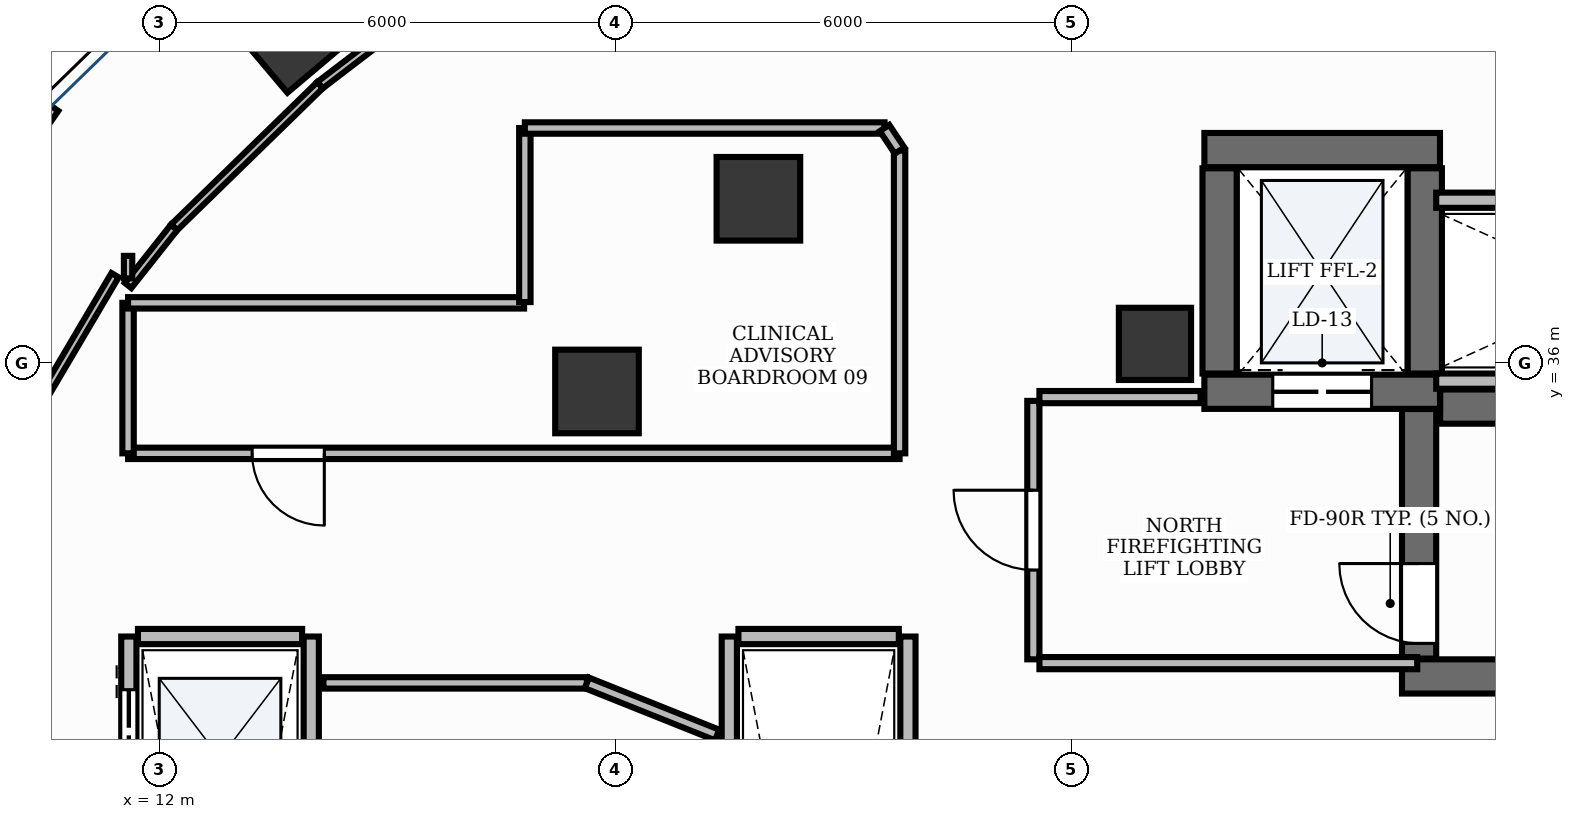
"""IFC4 building model, lengths in metres.
Left out: names, types, materials, properties, quantities, classifications, styles, units other than length and angle.
Written with IfcOpenShell. Run it as: python <this file> out.ifc"""

import sys

from ifc_helpers import new_model, si_unit, direction, frame, frame_2d, origin, origin_2d, place, context, subcontext, project, spatial, rectangle, extrude, element, fill, save


model = new_model("IFC4")
c1 = context("Model", 3, precision=1e-05, world=origin(), true_north=direction((0.0, 1.0)))
c2 = subcontext(c1, "Body", "Model", "MODEL_VIEW")
j1 = project(units=[si_unit("LENGTHUNIT", "METRE"), si_unit("PLANEANGLEUNIT", "RADIAN")], contexts=[c1])
p1 = place(None, origin())
s1 = spatial("IfcSite", under=j1, at=p1, CompositionType="ELEMENT")
p2 = place(p1, origin())
s2 = spatial("IfcBuilding", under=s1, at=p2, CompositionType="ELEMENT")
p3 = place(p2, frame((0.0, 0.0, 119.4)))
s3 = spatial("IfcBuildingStorey", under=s2, at=p3, CompositionType="ELEMENT", Elevation=119.4)
p4 = place(p3, frame((28.852, 35.425, 0.0), z_axis=(0.0, 0.0, 1.0), x_axis=(1.0, 0.0, 0.0)))
e1 = element("IfcWall", 1, at=p4, inside=s3, PredefinedType="SHEAR", context=c2, shape_type="SweptSolid", body=[
    extrude(rectangle(XDim=8.248, YDim=0.45, at=frame_2d((4.124, 0.0))), origin(), (0.0, 0.0, 1.0), 3.9),
])
p5 = place(p3, frame((28.35, 31.875, 0.0), z_axis=(0.0, 0.0, 1.0), x_axis=(1.0, 0.0, 0.0)))
e2 = element("IfcWall", 2, at=p5, inside=s3, PredefinedType="SHEAR", context=c2, shape_type="SweptSolid", body=[
    extrude(rectangle(XDim=8.75, YDim=0.45, at=frame_2d((4.375, 0.0))), origin(), (0.0, 0.0, 1.0), 3.9),
])
p6 = place(p3, frame((28.575, 32.11, 0.0), z_axis=(0.0, 0.0, 1.0), x_axis=(0.0, 1.0, 0.0)))
e3 = element("IfcWall", 3, at=p6, inside=s3, PredefinedType="SHEAR", context=c2, shape_type="SweptSolid", body=[
    extrude(rectangle(XDim=3.283, YDim=0.45, at=frame_2d((1.642, 0.0))), origin(), (0.0, 0.0, 1.0), 3.9),
])
p7 = place(p6, frame((0.2, 0.0, 0.0)))
e4 = element("IfcOpeningElement", 4, at=p7, cuts=e3, PredefinedType="OPENING", context=c2, shape_type="SweptSolid", body=[
    extrude(rectangle(XDim=1.05, YDim=2.15, at=frame_2d((0.525, 1.075))), frame((0.0, 0.24, 0.0), z_axis=(0.0, -1.0, 0.0), x_axis=(1.0, 0.0, 0.0)), (0.0, 0.0, 1.0), 0.48),
])
p8 = place(p3, frame((25.75, 38.8, 0.0), z_axis=(0.0, 0.0, 1.0), x_axis=(1.0, 0.0, 0.0)))
e5 = element("IfcWall", 5, at=p8, inside=s3, PredefinedType="SHEAR", context=c2, shape_type="SweptSolid", body=[
    extrude(rectangle(XDim=3.1, YDim=0.45, at=frame_2d((1.55, 0.0))), origin(), (0.0, 0.0, 1.0), 3.9),
])
p9 = place(p3, frame((25.75, 35.62, 0.0), z_axis=(0.0, 0.0, 1.0), x_axis=(1.0, 0.0, 0.0)))
e6 = element("IfcWall", 6, at=p9, inside=s3, PredefinedType="SHEAR", context=c2, shape_type="SweptSolid", body=[
    extrude(rectangle(XDim=3.1, YDim=0.45, at=frame_2d((1.55, 0.0))), origin(), (0.0, 0.0, 1.0), 3.9),
])
p10 = place(p9, frame((0.9, 0.0, 0.0)))
e7 = element("IfcOpeningElement", 7, at=p10, cuts=e6, PredefinedType="OPENING", context=c2, shape_type="SweptSolid", body=[
    extrude(rectangle(XDim=1.3, YDim=2.2, at=frame_2d((0.65, 1.1))), frame((0.0, 0.24, 0.0), z_axis=(0.0, -1.0, 0.0), x_axis=(1.0, 0.0, 0.0)), (0.0, 0.0, 1.0), 0.48),
])
for number, where, z_axis, x_axis in (
    (8, (25.95, 35.86, 0.0), (0.0, 0.0, 1.0), (0.0, 1.0, 0.0)),
    (9, (28.65, 35.86, 0.0), (0.0, 0.0, 1.0), (0.0, 1.0, 0.0)),
):
    element("IfcWall", number, at=place(p3, frame(where, z_axis=z_axis, x_axis=x_axis)), inside=s3, PredefinedType="SHEAR", context=c2, shape_type="SweptSolid", body=[
        extrude(rectangle(XDim=2.7, YDim=0.45, at=frame_2d((1.35, 0.0))), origin(), (0.0, 0.0, 1.0), 3.9),
    ])
p11 = place(p3, frame((25.1, 36.25, -0.0), z_axis=(0.0, 0.0, 1.0), x_axis=(1.0, 0.0, 0.0)))
e10 = element("IfcColumn", 10, at=p11, inside=s3, PredefinedType="PILASTER", context=c2, shape_type="SweptSolid", body=[
    extrude(rectangle(XDim=0.95, YDim=0.95, at=origin_2d()), origin(), (0.0, 0.0, 1.0), 3.901),
])
p12 = place(p3, frame((13.758, 40.4, -0.0), z_axis=(0.0, 0.0, 1.0), x_axis=(0.764246456939, 0.644924300253, 0.0)))
e11 = element("IfcColumn", 11, at=p12, inside=s3, PredefinedType="COLUMN", context=c2, shape_type="SweptSolid", body=[
    extrude(rectangle(XDim=1.2, YDim=1.2, at=origin_2d()), origin(), (0.0, 0.0, 1.0), 3.901),
])
for number, where, z_axis, x_axis in (
    (12, (19.883, 38.159, -0.0), (0.0, 0.0, 1.0), (1.0, 0.0, 0.0)),
    (13, (17.759, 35.624, -0.0), (0.0, 0.0, 1.0), (1.0, 0.0, 0.0)),
):
    element("IfcColumn", number, at=place(p3, frame(where, z_axis=z_axis, x_axis=x_axis)), inside=s3, PredefinedType="COLUMN", context=c2, shape_type="SweptSolid", body=[
        extrude(rectangle(XDim=1.1, YDim=1.1, at=origin_2d()), origin(), (0.0, 0.0, 1.0), 3.901),
    ])
p13 = place(p3, frame((10.548, 39.4, 0.0), z_axis=(0.0, 0.0, 1.0), x_axis=(-0.566825798999, -0.823837674296, 0.0)))
e14 = element("IfcWall", 14, at=p13, inside=s3, PredefinedType="STANDARD", context=c2, shape_type="SweptSolid", body=[
    extrude(rectangle(XDim=5.826, YDim=0.3, at=frame_2d((2.913, 0.0))), origin(), (0.0, 0.0, 1.0), 3.9),
])
p14 = place(p3, frame((11.6, 21.6, 0.0), z_axis=(0.0, 0.0, 1.0), x_axis=(0.0, 1.0, 0.0)))
e15 = element("IfcWall", 15, at=p14, inside=s3, PredefinedType="PARTITIONING", context=c2, shape_type="SweptSolid", body=[
    extrude(rectangle(XDim=10.8, YDim=0.2, at=frame_2d((5.4, 0.0))), origin(), (0.0, 0.0, 1.0), 2.91),
])
p15 = place(p14, frame((0.9, 0.0, 0.0)))
e16 = element("IfcOpeningElement", 16, at=p15, cuts=e15, PredefinedType="OPENING", context=c2, shape_type="SweptSolid", body=[
    extrude(rectangle(XDim=1.1, YDim=2.2, at=frame_2d((0.55, 1.1))), frame((0.0, 0.115, 0.0), z_axis=(0.0, -1.0, 0.0), x_axis=(1.0, 0.0, 0.0)), (0.0, 0.0, 1.0), 0.23),
])
p16 = place(p14, frame((3.6, 0.0, 0.0)))
e17 = element("IfcOpeningElement", 17, at=p16, cuts=e15, PredefinedType="OPENING", context=c2, shape_type="SweptSolid", body=[
    extrude(rectangle(XDim=1.1, YDim=2.2, at=frame_2d((0.55, 1.1))), frame((0.0, 0.115, 0.0), z_axis=(0.0, -1.0, 0.0), x_axis=(1.0, 0.0, 0.0)), (0.0, 0.0, 1.0), 0.23),
])
p17 = place(p14, frame((6.3, 0.0, 0.0)))
e18 = element("IfcOpeningElement", 18, at=p17, cuts=e15, PredefinedType="OPENING", context=c2, shape_type="SweptSolid", body=[
    extrude(rectangle(XDim=1.1, YDim=2.2, at=frame_2d((0.55, 1.1))), frame((0.0, 0.115, 0.0), z_axis=(0.0, -1.0, 0.0), x_axis=(1.0, 0.0, 0.0)), (0.0, 0.0, 1.0), 0.23),
])
p18 = place(p14, frame((9.0, 0.0, 0.0)))
e19 = element("IfcOpeningElement", 19, at=p18, cuts=e15, PredefinedType="OPENING", context=c2, shape_type="SweptSolid", body=[
    extrude(rectangle(XDim=1.1, YDim=2.2, at=frame_2d((0.55, 1.1))), frame((0.0, 0.115, 0.0), z_axis=(0.0, -1.0, 0.0), x_axis=(1.0, 0.0, 0.0)), (0.0, 0.0, 1.0), 0.23),
])
p19 = place(p3, frame((14.0, 21.6, 0.0), z_axis=(0.0, 0.0, 1.0), x_axis=(0.0, 1.0, 0.0)))
e20 = element("IfcWall", 20, at=p19, inside=s3, PredefinedType="PARTITIONING", context=c2, shape_type="SweptSolid", body=[
    extrude(rectangle(XDim=10.8, YDim=0.2, at=frame_2d((5.4, 0.0))), origin(), (0.0, 0.0, 1.0), 2.91),
])
p20 = place(p3, frame((11.72, 32.4, 0.0), z_axis=(0.0, 0.0, 1.0), x_axis=(1.0, 0.0, 0.0)))
e21 = element("IfcWall", 21, at=p20, inside=s3, PredefinedType="PARTITIONING", context=c2, shape_type="SweptSolid", body=[
    extrude(rectangle(XDim=2.16, YDim=0.2, at=frame_2d((1.08, 0.0))), origin(), (0.0, 0.0, 1.0), 2.91),
])
for number, where, z_axis, x_axis in (
    (22, (19.5, 21.6, 0.0), (0.0, 0.0, 1.0), (0.0, 1.0, 0.0)),
    (23, (21.85, 21.6, 0.0), (0.0, 0.0, 1.0), (0.0, 1.0, 0.0)),
):
    element("IfcWall", number, at=place(p3, frame(where, z_axis=z_axis, x_axis=x_axis)), inside=s3, PredefinedType="PARTITIONING", context=c2, shape_type="SweptSolid", body=[
        extrude(rectangle(XDim=10.8, YDim=0.2, at=frame_2d((5.4, 0.0))), origin(), (0.0, 0.0, 1.0), 2.91),
    ])
p21 = place(p3, frame((19.62, 32.4, 0.0), z_axis=(0.0, 0.0, 1.0), x_axis=(1.0, 0.0, 0.0)))
e24 = element("IfcWall", 24, at=p21, inside=s3, PredefinedType="PARTITIONING", context=c2, shape_type="SweptSolid", body=[
    extrude(rectangle(XDim=2.11, YDim=0.2, at=frame_2d((1.055, 0.0))), origin(), (0.0, 0.0, 1.0), 2.91),
])
for number, where, z_axis, x_axis in (
    (25, (28.8, 35.76, 0.0), (0.0, 0.0, 1.0), (1.0, 0.0, 0.0)),
    (26, (28.8, 38.14, 0.0), (0.0, 0.0, 1.0), (1.0, 0.0, 0.0)),
):
    element("IfcWall", number, at=place(p3, frame(where, z_axis=z_axis, x_axis=x_axis)), inside=s3, PredefinedType="PARTITIONING", context=c2, shape_type="SweptSolid", body=[
        extrude(rectangle(XDim=4.57, YDim=0.2, at=frame_2d((2.285, 0.0))), origin(), (0.0, 0.0, 1.0), 2.91),
    ])
p22 = place(p3, frame((23.5, 32.1, 0.0), z_axis=(0.0, 0.0, 1.0), x_axis=(0.0, 1.0, 0.0)))
e27 = element("IfcWall", 27, at=p22, inside=s3, PredefinedType="PARTITIONING", context=c2, shape_type="SweptSolid", body=[
    extrude(rectangle(XDim=3.4, YDim=0.16, at=frame_2d((1.7, 0.0))), origin(), (0.0, 0.0, 1.0), 2.91),
])
p23 = place(p22, frame((1.175, 0.0, 0.0)))
e28 = element("IfcOpeningElement", 28, at=p23, cuts=e27, PredefinedType="OPENING", context=c2, shape_type="SweptSolid", body=[
    extrude(rectangle(XDim=1.05, YDim=2.15, at=frame_2d((0.525, 1.075))), frame((0.0, 0.095, 0.0), z_axis=(0.0, -1.0, 0.0), x_axis=(1.0, 0.0, 0.0)), (0.0, 0.0, 1.0), 0.19),
])
p24 = place(p3, frame((23.58, 32.05, 0.0), z_axis=(0.0, 0.0, 1.0), x_axis=(1.0, 0.0, 0.0)))
e29 = element("IfcWall", 29, at=p24, inside=s3, PredefinedType="PARTITIONING", context=c2, shape_type="SweptSolid", body=[
    extrude(rectangle(XDim=4.97, YDim=0.16, at=frame_2d((2.485, 0.0))), origin(), (0.0, 0.0, 1.0), 2.91),
])
p25 = place(p3, frame((23.58, 35.55, 0.0), z_axis=(0.0, 0.0, 1.0), x_axis=(1.0, 0.0, 0.0)))
e30 = element("IfcWall", 30, at=p25, inside=s3, PredefinedType="PARTITIONING", context=c2, shape_type="SweptSolid", body=[
    extrude(rectangle(XDim=2.12, YDim=0.16, at=frame_2d((1.06, 0.0))), origin(), (0.0, 0.0, 1.0), 2.91),
])
p26 = place(p3, frame((21.74, 34.81, 0.0), z_axis=(0.0, 0.0, 1.0), x_axis=(-1.0, 0.0, 0.0)))
e31 = element("IfcWall", 31, at=p26, inside=s3, PredefinedType="PARTITIONING", context=c2, shape_type="SweptSolid", body=[
    extrude(rectangle(XDim=10.15, YDim=0.15, at=frame_2d((5.075, 0.0))), origin(), (0.0, 0.0, 1.0), 2.91),
])
p27 = place(p26, frame((7.568, 0.0, 0.0)))
e32 = element("IfcOpeningElement", 32, at=p27, cuts=e31, PredefinedType="OPENING", context=c2, shape_type="SweptSolid", body=[
    extrude(rectangle(XDim=0.95, YDim=2.15, at=frame_2d((0.475, 1.075))), frame((0.0, 0.09, 0.0), z_axis=(0.0, -1.0, 0.0), x_axis=(1.0, 0.0, 0.0)), (0.0, 0.0, 1.0), 0.18),
])
p28 = place(p3, frame((14.16, 31.79, 0.0), z_axis=(0.0, 0.0, 1.0), x_axis=(1.0, 0.0, 0.0)))
e33 = element("IfcWall", 33, at=p28, inside=s3, PredefinedType="PARTITIONING", context=c2, shape_type="SweptSolid", body=[
    extrude(rectangle(XDim=3.467, YDim=0.15, at=frame_2d((1.733, 0.0))), origin(), (0.0, 0.0, 1.0), 2.91),
])
p29 = place(p3, frame((17.626, 31.79, 0.0), z_axis=(0.0, 0.0, 1.0), x_axis=(0.928485814786, -0.371367865789, 0.0)))
e34 = element("IfcWall", 34, at=p29, inside=s3, PredefinedType="PARTITIONING", context=c2, shape_type="SweptSolid", body=[
    extrude(rectangle(XDim=1.845, YDim=0.15, at=frame_2d((0.923, 0.0))), origin(), (0.0, 0.0, 1.0), 2.91),
])
p30 = place(p3, frame((16.339, 41.354, 0.0), z_axis=(0.0, 0.0, 1.0), x_axis=(-0.794513779695, -0.607246122981, 0.0)))
e35 = element("IfcWall", 35, at=p30, inside=s3, PredefinedType="MOVABLE", context=c2, shape_type="SweptSolid", body=[
    extrude(rectangle(XDim=2.799, YDim=0.11, at=frame_2d((1.399, 0.0))), origin(), (0.0, 0.0, 1.0), 2.91),
])
p31 = place(p3, frame((14.114, 39.653, 0.0), z_axis=(0.0, 0.0, 1.0), x_axis=(-0.716161838398, -0.697934252794, 0.0)))
e36 = element("IfcWall", 36, at=p31, inside=s3, PredefinedType="MOVABLE", context=c2, shape_type="SweptSolid", body=[
    extrude(rectangle(XDim=2.679, YDim=0.11, at=frame_2d((1.339, 0.0))), origin(), (0.0, 0.0, 1.0), 2.91),
])
p32 = place(p3, frame((12.195, 37.782, 0.0), z_axis=(0.0, 0.0, 1.0), x_axis=(-0.621081637991, -0.783745876513, 0.0)))
e37 = element("IfcWall", 37, at=p32, inside=s3, PredefinedType="MOVABLE", context=c2, shape_type="SweptSolid", body=[
    extrude(rectangle(XDim=0.974, YDim=0.11, at=frame_2d((0.487, 0.0))), origin(), (0.0, 0.0, 1.0), 2.91),
])
p33 = place(p3, frame((11.59, 37.112, 0.0), z_axis=(0.0, 0.0, 1.0), x_axis=(0.0, 1.0, 0.0)))
e38 = element("IfcWall", 38, at=p33, inside=s3, PredefinedType="MOVABLE", context=c2, shape_type="SweptSolid", body=[
    extrude(rectangle(XDim=0.296, YDim=0.11, at=frame_2d((0.148, 0.0))), origin(), (0.0, 0.0, 1.0), 2.91),
])
p34 = place(p3, frame((11.419, 37.154, 0.0), z_axis=(0.0, 0.0, 1.0), x_axis=(-0.508183269016, -0.861248956511, 0.0)))
e39 = element("IfcWall", 39, at=p34, inside=s3, PredefinedType="MOVABLE", context=c2, shape_type="SweptSolid", body=[
    extrude(rectangle(XDim=4.053, YDim=0.11, at=frame_2d((2.026, 0.0))), origin(), (0.0, 0.0, 1.0), 2.91),
])
p35 = place(p3, frame((21.74, 38.793, 0.0), z_axis=(0.0, 0.0, 1.0), x_axis=(0.0, -1.0, 0.0)))
e40 = element("IfcWall", 40, at=p35, inside=s3, PredefinedType="PARTITIONING", context=c2, shape_type="SweptSolid", body=[
    extrude(rectangle(XDim=3.983, YDim=0.15, at=frame_2d((1.992, 0.0))), origin(), (0.0, 0.0, 1.0), 2.91),
])
p36 = place(p3, frame((11.59, 34.81, 0.0), z_axis=(0.0, 0.0, 1.0), x_axis=(0.0, 1.0, 0.0)))
e41 = element("IfcWall", 41, at=p36, inside=s3, PredefinedType="PARTITIONING", context=c2, shape_type="SweptSolid", body=[
    extrude(rectangle(XDim=1.98, YDim=0.15, at=frame_2d((0.99, 0.0))), origin(), (0.0, 0.0, 1.0), 2.91),
])
p37 = place(p3, frame((11.59, 36.79, 0.0), z_axis=(0.0, 0.0, 1.0), x_axis=(1.0, 0.0, 0.0)))
e42 = element("IfcWall", 42, at=p37, inside=s3, PredefinedType="PARTITIONING", context=c2, shape_type="SweptSolid", body=[
    extrude(rectangle(XDim=5.21, YDim=0.15, at=frame_2d((2.605, 0.0))), origin(), (0.0, 0.0, 1.0), 2.91),
])
p38 = place(p3, frame((16.81, 36.8, 0.0), z_axis=(0.0, 0.0, 1.0), x_axis=(0.0, 1.0, 0.0)))
e43 = element("IfcWall", 43, at=p38, inside=s3, PredefinedType="PARTITIONING", context=c2, shape_type="SweptSolid", body=[
    extrude(rectangle(XDim=2.29, YDim=0.15, at=frame_2d((1.145, 0.0))), origin(), (0.0, 0.0, 1.0), 2.91),
])
p39 = place(p3, frame((16.81, 39.09, 0.0), z_axis=(0.0, 0.0, 1.0), x_axis=(1.0, 0.0, 0.0)))
e44 = element("IfcWall", 44, at=p39, inside=s3, PredefinedType="PARTITIONING", context=c2, shape_type="SweptSolid", body=[
    extrude(rectangle(XDim=4.732, YDim=0.15, at=frame_2d((2.366, 0.0))), origin(), (0.0, 0.0, 1.0), 2.91),
])
p40 = place(p3, frame((21.542, 39.09, 0.0), z_axis=(0.0, 0.0, 1.0), x_axis=(0.554700196225, -0.832050294338, 0.0)))
e45 = element("IfcWall", 45, at=p40, inside=s3, PredefinedType="PARTITIONING", context=c2, shape_type="SweptSolid", body=[
    extrude(rectangle(XDim=0.356, YDim=0.15, at=frame_2d((0.178, 0.0))), origin(), (0.0, 0.0, 1.0), 2.91),
])
p41 = place(p7, origin())
e46 = element("IfcDoor", 46, at=p41, inside=s3, OperationType="SINGLE_SWING_RIGHT", PredefinedType="DOOR", context=c2, shape_type="SweptSolid", body=[
    extrude(rectangle(XDim=1.05, YDim=2.15, at=frame_2d((0.525, 1.075))), frame((0.0, 0.025, 0.0), z_axis=(0.0, -1.0, 0.0), x_axis=(1.0, 0.0, 0.0)), (0.0, 0.0, 1.0), 0.05),
])
fill(e4, e46)
p42 = place(p18, origin())
e47 = element("IfcDoor", 47, at=p42, inside=s3, OperationType="DOUBLE_DOOR_SLIDING", PredefinedType="DOOR", context=c2, shape_type="SweptSolid", body=[
    extrude(rectangle(XDim=1.1, YDim=2.2, at=frame_2d((0.55, 1.1))), frame((0.0, 0.025, 0.0), z_axis=(0.0, -1.0, 0.0), x_axis=(1.0, 0.0, 0.0)), (0.0, 0.0, 1.0), 0.05),
])
fill(e19, e47)
p43 = place(p10, origin())
e48 = element("IfcDoor", 48, at=p43, inside=s3, OperationType="DOUBLE_DOOR_SLIDING", PredefinedType="DOOR", context=c2, shape_type="SweptSolid", body=[
    extrude(rectangle(XDim=1.3, YDim=2.2, at=frame_2d((0.65, 1.1))), frame((0.0, 0.025, 0.0), z_axis=(0.0, -1.0, 0.0), x_axis=(1.0, 0.0, 0.0)), (0.0, 0.0, 1.0), 0.05),
])
fill(e7, e48)
p44 = place(p23, origin())
e49 = element("IfcDoor", 49, at=p44, inside=s3, OperationType="SINGLE_SWING_RIGHT", PredefinedType="DOOR", context=c2, shape_type="SweptSolid", body=[
    extrude(rectangle(XDim=1.05, YDim=2.15, at=frame_2d((0.525, 1.075))), frame((0.0, 0.025, 0.0), z_axis=(0.0, -1.0, 0.0), x_axis=(1.0, 0.0, 0.0)), (0.0, 0.0, 1.0), 0.05),
])
fill(e28, e49)
p45 = place(p27, origin())
e50 = element("IfcDoor", 50, at=p45, inside=s3, OperationType="SINGLE_SWING_LEFT", PredefinedType="DOOR", context=c2, shape_type="SweptSolid", body=[
    extrude(rectangle(XDim=0.95, YDim=2.15, at=frame_2d((0.475, 1.075))), frame((0.0, 0.025, 0.0), z_axis=(0.0, -1.0, 0.0), x_axis=(1.0, 0.0, 0.0)), (0.0, 0.0, 1.0), 0.05),
])
fill(e32, e50)
save(model, sys.argv[1])
